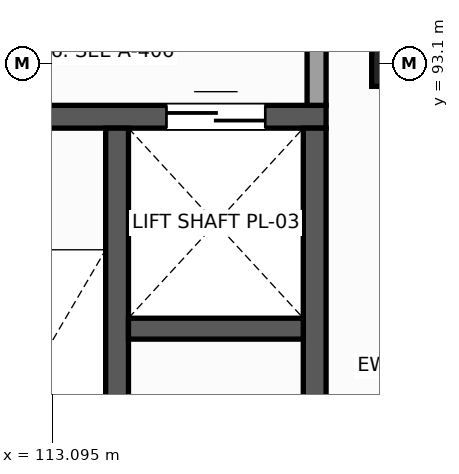
"""IFC4 building model, lengths in metres.
Left out: names, types, materials, properties, quantities, classifications, styles, units other than length and angle.
Written with IfcOpenShell. Run it as: python <this file> out.ifc"""

import sys

from ifc_helpers import new_model, si_unit, direction, frame, frame_2d, origin, origin_2d, place, context, subcontext, project, spatial, rectangle, extrude, element, fill, save


model = new_model("IFC4")
c1 = context("Model", 3, precision=1e-05, world=origin(), true_north=direction((0.0, 1.0)))
c2 = subcontext(c1, "Body", "Model", "MODEL_VIEW")
j1 = project(units=[si_unit("LENGTHUNIT", "METRE"), si_unit("PLANEANGLEUNIT", "RADIAN")], contexts=[c1])
p1 = place(None, origin())
s1 = spatial("IfcSite", under=j1, at=p1, CompositionType="ELEMENT")
p2 = place(p1, origin())
s2 = spatial("IfcBuilding", under=s1, at=p2, CompositionType="ELEMENT")
p3 = place(p2, frame((0.0, 0.0, 15.6)))
s3 = spatial("IfcBuildingStorey", under=s2, at=p3, CompositionType="ELEMENT", Elevation=15.6)
p4 = place(p3, frame((117.6, 93.1, 0.0), z_axis=(0.0, 0.0, 1.0), x_axis=(1.0, 0.0, 0.0)))
e1 = element("IfcColumn", 1, at=p4, inside=s3, PredefinedType="COLUMN", context=c2, shape_type="SweptSolid", body=[
    extrude(rectangle(XDim=0.6, YDim=0.6, at=origin_2d()), origin(), (0.0, 0.0, 1.0), 4.5),
])
p5 = place(p3, frame((110.1, 92.4, 0.0), z_axis=(0.0, 0.0, 1.0), x_axis=(1.0, 0.0, 0.0)))
e2 = element("IfcWall", 2, at=p5, inside=s3, PredefinedType="SHEAR", context=c2, shape_type="SweptSolid", body=[
    extrude(rectangle(XDim=6.6, YDim=0.3, at=frame_2d((3.3, 0.0))), origin(), (0.0, 0.0, 1.0), 4.2),
])
p6 = place(p5, frame((1.425, 0.0, 0.0)))
e3 = element("IfcOpeningElement", 3, at=p6, cuts=e2, PredefinedType="OPENING", context=c2, shape_type="SweptSolid", body=[
    extrude(rectangle(XDim=1.15, YDim=2.2, at=frame_2d((0.575, 1.1))), frame((0.0, 0.16, 0.0), z_axis=(0.0, -1.0, 0.0), x_axis=(1.0, 0.0, 0.0)), (0.0, 0.0, 1.0), 0.32),
])
p7 = place(p5, frame((4.5, 0.0, 0.0)))
e4 = element("IfcOpeningElement", 4, at=p7, cuts=e2, PredefinedType="OPENING", context=c2, shape_type="SweptSolid", body=[
    extrude(rectangle(XDim=1.3, YDim=2.2, at=frame_2d((0.65, 1.1))), frame((0.0, 0.16, 0.0), z_axis=(0.0, -1.0, 0.0), x_axis=(1.0, 0.0, 0.0)), (0.0, 0.0, 1.0), 0.32),
])
for number, where, z_axis, x_axis in (
    (5, (116.55, 84.85, 0.0), (0.0, 0.0, 1.0), (0.0, 1.0, 0.0)),
    (6, (113.95, 84.85, 0.0), (0.0, 0.0, 1.0), (0.0, 1.0, 0.0)),
):
    element("IfcWall", number, at=place(p3, frame(where, z_axis=z_axis, x_axis=x_axis)), inside=s3, PredefinedType="SHEAR", context=c2, shape_type="SweptSolid", body=[
        extrude(rectangle(XDim=7.4, YDim=0.3, at=frame_2d((3.7, 0.0))), origin(), (0.0, 0.0, 1.0), 4.2),
    ])
p8 = place(p3, frame((114.1, 89.612, 0.0), z_axis=(0.0, 0.0, 1.0), x_axis=(1.0, 0.0, 0.0)))
e7 = element("IfcWall", 7, at=p8, inside=s3, PredefinedType="SHEAR", context=c2, shape_type="SweptSolid", body=[
    extrude(rectangle(XDim=2.3, YDim=0.275, at=frame_2d((1.15, 0.0))), origin(), (0.0, 0.0, 1.0), 4.2),
])
p9 = place(p3, frame((116.575, 92.55, 0.0), z_axis=(0.0, 0.0, 1.0), x_axis=(0.0, 1.0, 0.0)))
e8 = element("IfcWall", 8, at=p9, inside=s3, PredefinedType="PARTITIONING", context=c2, shape_type="SweptSolid", body=[
    extrude(rectangle(XDim=2.95, YDim=0.25, at=frame_2d((1.475, 0.0))), origin(), (0.0, 0.0, 1.0), 3.43),
])
p10 = place(p7, origin())
e9 = element("IfcDoor", 9, at=p10, inside=s3, OperationType="DOUBLE_DOOR_SLIDING", PredefinedType="DOOR", context=c2, shape_type="SweptSolid", body=[
    extrude(rectangle(XDim=1.3, YDim=2.2, at=frame_2d((0.65, 1.1))), frame((0.0, 0.025, 0.0), z_axis=(0.0, -1.0, 0.0), x_axis=(1.0, 0.0, 0.0)), (0.0, 0.0, 1.0), 0.05),
])
fill(e4, e9)
save(model, sys.argv[1])
